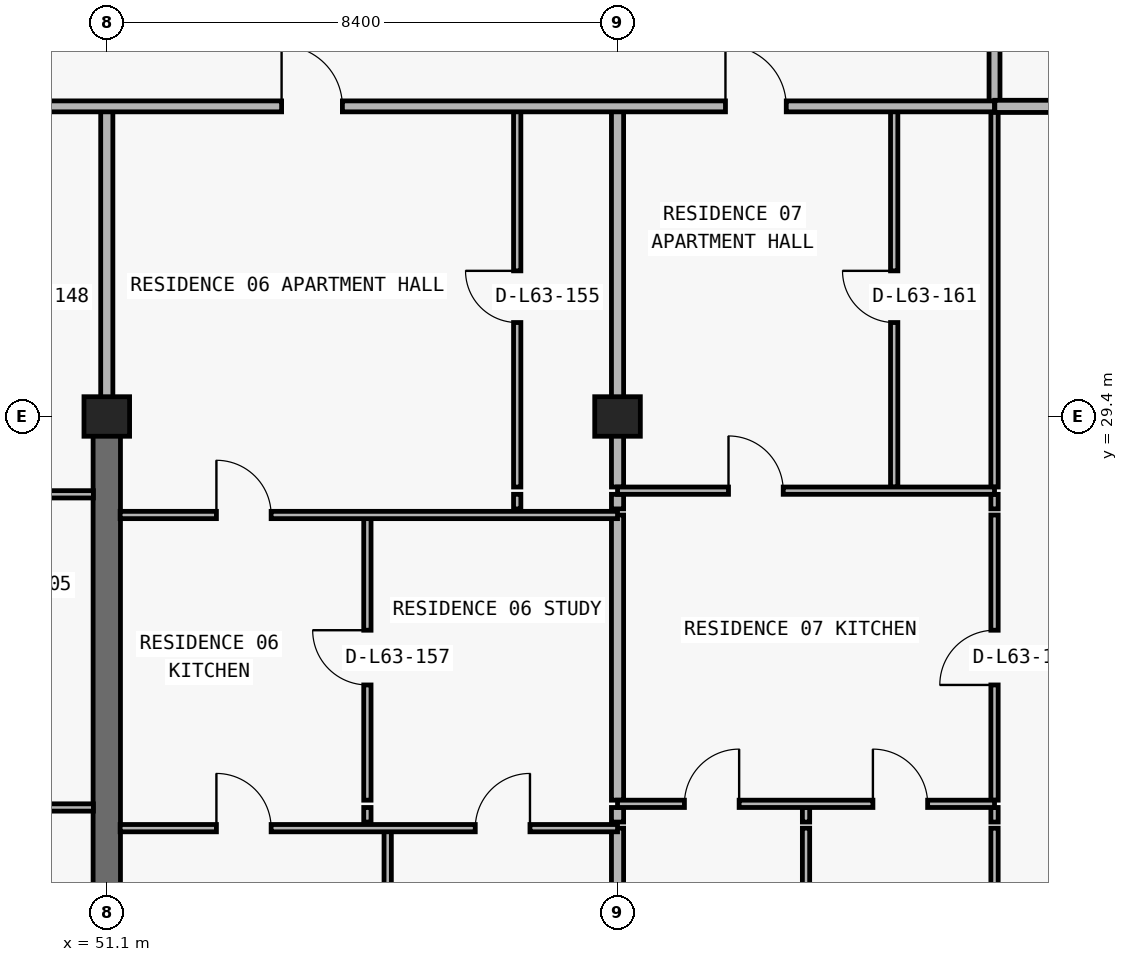
"""IFC4 building model, lengths in metres.
Left out: names, types, materials, properties, quantities, classifications, styles, units other than length and angle.
Written with IfcOpenShell. Run it as: python <this file> out.ifc"""

import sys

from ifc_helpers import new_model, si_unit, direction, frame, frame_2d, origin, origin_2d, place, context, subcontext, project, spatial, rectangle, extrude, element, fill, save


model = new_model("IFC4")
c1 = context("Model", 3, precision=1e-05, world=origin(), true_north=direction((0.0, 1.0)))
c2 = subcontext(c1, "Body", "Model", "MODEL_VIEW")
j1 = project(units=[si_unit("LENGTHUNIT", "METRE"), si_unit("PLANEANGLEUNIT", "RADIAN")], contexts=[c1])
p1 = place(None, origin())
s1 = spatial("IfcSite", under=j1, at=p1, CompositionType="ELEMENT")
p2 = place(p1, origin())
s2 = spatial("IfcBuilding", under=s1, at=p2, CompositionType="ELEMENT")
p3 = place(p2, frame((0.0, 0.0, 226.5)))
s3 = spatial("IfcBuildingStorey", under=s2, at=p3, CompositionType="ELEMENT", Elevation=226.5)
for number, where, z_axis, x_axis in (
    (1, (51.1, 29.4, 0.0), (0.0, 0.0, 1.0), (1.0, 0.0, 0.0)),
    (2, (59.5, 29.4, 0.0), (0.0, 0.0, 1.0), (1.0, 0.0, 0.0)),
):
    element("IfcColumn", number, at=place(p3, frame(where, z_axis=z_axis, x_axis=x_axis)), inside=s3, PredefinedType="COLUMN", context=c2, shape_type="SweptSolid", body=[
        extrude(rectangle(XDim=0.75, YDim=0.65, at=origin_2d()), origin(), (0.0, 0.0, 1.0), 3.05),
    ])
p4 = place(p3, frame((51.1, 20.8, 0.0), z_axis=(0.0, 0.0, 1.0), x_axis=(0.0, 1.0, 0.0)))
e3 = element("IfcWall", 3, at=p4, inside=s3, PredefinedType="SHEAR", context=c2, shape_type="SweptSolid", body=[
    extrude(rectangle(XDim=8.6, YDim=0.45, at=frame_2d((4.3, 0.0))), origin(), (0.0, 0.0, 1.0), 3.05),
])
p5 = place(p3, frame((51.1, 29.405, 0.0), z_axis=(0.0, 0.0, 1.0), x_axis=(0.0, 1.0, 0.0)))
e4 = element("IfcWall", 4, at=p5, inside=s3, PredefinedType="PARTITIONING", context=c2, shape_type="SweptSolid", body=[
    extrude(rectangle(XDim=5.095, YDim=0.2, at=frame_2d((2.547, 0.0))), origin(), (0.0, 0.0, 1.0), 2.335),
])
p6 = place(p3, frame((55.386, 22.73, 0.0), z_axis=(0.0, 0.0, 1.0), x_axis=(0.0, 1.0, 0.0)))
e5 = element("IfcWall", 5, at=p6, inside=s3, PredefinedType="PARTITIONING", context=c2, shape_type="SweptSolid", body=[
    extrude(rectangle(XDim=0.24, YDim=0.12, at=frame_2d((0.12, 0.0))), origin(), (0.0, 0.0, 1.0), 2.629),
])
p7 = place(p3, frame((55.386, 23.09, 0.0), z_axis=(0.0, 0.0, 1.0), x_axis=(0.0, 1.0, 0.0)))
e6 = element("IfcWall", 6, at=p7, inside=s3, PredefinedType="PARTITIONING", context=c2, shape_type="SweptSolid", body=[
    extrude(rectangle(XDim=4.69, YDim=0.12, at=frame_2d((2.345, 0.0))), origin(), (0.0, 0.0, 1.0), 2.629),
])
p8 = place(p7, frame((1.895, 0.0, 0.0)))
e7 = element("IfcOpeningElement", 7, at=p8, cuts=e6, PredefinedType="OPENING", context=c2, shape_type="SweptSolid", body=[
    extrude(rectangle(XDim=0.9, YDim=2.15, at=frame_2d((0.45, 1.075))), frame((0.0, 0.07, 0.0), z_axis=(0.0, -1.0, 0.0), x_axis=(1.0, 0.0, 0.0)), (0.0, 0.0, 1.0), 0.14),
])
p9 = place(p3, frame((55.72, 13.34, 0.0), z_axis=(0.0, 0.0, 1.0), x_axis=(0.0, 1.0, 0.0)))
e8 = element("IfcWall", 8, at=p9, inside=s3, PredefinedType="PARTITIONING", context=c2, shape_type="SweptSolid", body=[
    extrude(rectangle(XDim=9.29, YDim=0.12, at=frame_2d((4.645, 0.0))), origin(), (0.0, 0.0, 1.0), 3.05),
])
p10 = place(p3, frame((57.85, 27.88, 0.0), z_axis=(0.0, 0.0, 1.0), x_axis=(0.0, 1.0, 0.0)))
e9 = element("IfcWall", 9, at=p10, inside=s3, PredefinedType="PARTITIONING", context=c2, shape_type="SweptSolid", body=[
    extrude(rectangle(XDim=0.24, YDim=0.12, at=frame_2d((0.12, 0.0))), origin(), (0.0, 0.0, 1.0), 3.05),
])
p11 = place(p3, frame((57.85, 28.24, 0.0), z_axis=(0.0, 0.0, 1.0), x_axis=(0.0, 1.0, 0.0)))
e10 = element("IfcWall", 10, at=p11, inside=s3, PredefinedType="PARTITIONING", context=c2, shape_type="SweptSolid", body=[
    extrude(rectangle(XDim=6.26, YDim=0.12, at=frame_2d((3.13, 0.0))), origin(), (0.0, 0.0, 1.0), 3.05),
])
p12 = place(p11, frame((2.705, 0.0, 0.0)))
e11 = element("IfcOpeningElement", 11, at=p12, cuts=e10, PredefinedType="OPENING", context=c2, shape_type="SweptSolid", body=[
    extrude(rectangle(XDim=0.85, YDim=2.1, at=frame_2d((0.425, 1.05))), frame((0.0, 0.07, 0.0), z_axis=(0.0, -1.0, 0.0), x_axis=(1.0, 0.0, 0.0)), (0.0, 0.0, 1.0), 0.14),
])
p13 = place(p3, frame((59.5, 13.34, 0.0), z_axis=(0.0, 0.0, 1.0), x_axis=(0.0, 1.0, 0.0)))
e12 = element("IfcWall", 12, at=p13, inside=s3, PredefinedType="PARTITIONING", context=c2, shape_type="SweptSolid", body=[
    extrude(rectangle(XDim=9.29, YDim=0.2, at=frame_2d((4.645, 0.0))), origin(), (0.0, 0.0, 1.0), 2.263),
])
p14 = place(p3, frame((59.5, 22.73, 0.0), z_axis=(0.0, 0.0, 1.0), x_axis=(0.0, 1.0, 0.0)))
e13 = element("IfcWall", 13, at=p14, inside=s3, PredefinedType="PARTITIONING", context=c2, shape_type="SweptSolid", body=[
    extrude(rectangle(XDim=0.24, YDim=0.2, at=frame_2d((0.12, 0.0))), origin(), (0.0, 0.0, 1.0), 2.263),
])
p15 = place(p3, frame((59.5, 23.09, 0.0), z_axis=(0.0, 0.0, 1.0), x_axis=(0.0, 1.0, 0.0)))
e14 = element("IfcWall", 14, at=p15, inside=s3, PredefinedType="PARTITIONING", context=c2, shape_type="SweptSolid", body=[
    extrude(rectangle(XDim=4.69, YDim=0.2, at=frame_2d((2.345, 0.0))), origin(), (0.0, 0.0, 1.0), 2.263),
])
p16 = place(p3, frame((59.5, 27.88, 0.0), z_axis=(0.0, 0.0, 1.0), x_axis=(0.0, 1.0, 0.0)))
e15 = element("IfcWall", 15, at=p16, inside=s3, PredefinedType="PARTITIONING", context=c2, shape_type="SweptSolid", body=[
    extrude(rectangle(XDim=0.24, YDim=0.2, at=frame_2d((0.12, 0.0))), origin(), (0.0, 0.0, 1.0), 2.263),
])
p17 = place(p3, frame((59.5, 28.24, 0.0), z_axis=(0.0, 0.0, 1.0), x_axis=(0.0, 1.0, 0.0)))
e16 = element("IfcWall", 16, at=p17, inside=s3, PredefinedType="PARTITIONING", context=c2, shape_type="SweptSolid", body=[
    extrude(rectangle(XDim=6.26, YDim=0.2, at=frame_2d((3.13, 0.0))), origin(), (0.0, 0.0, 1.0), 2.263),
])
p18 = place(p3, frame((62.6, 13.34, 0.0), z_axis=(0.0, 0.0, 1.0), x_axis=(0.0, 1.0, 0.0)))
e17 = element("IfcWall", 17, at=p18, inside=s3, PredefinedType="PARTITIONING", context=c2, shape_type="SweptSolid", body=[
    extrude(rectangle(XDim=9.29, YDim=0.12, at=frame_2d((4.645, 0.0))), origin(), (0.0, 0.0, 1.0), 3.05),
])
p19 = place(p3, frame((62.6, 22.73, 0.0), z_axis=(0.0, 0.0, 1.0), x_axis=(0.0, 1.0, 0.0)))
e18 = element("IfcWall", 18, at=p19, inside=s3, PredefinedType="PARTITIONING", context=c2, shape_type="SweptSolid", body=[
    extrude(rectangle(XDim=0.24, YDim=0.12, at=frame_2d((0.12, 0.0))), origin(), (0.0, 0.0, 1.0), 3.05),
])
p20 = place(p3, frame((64.05, 28.24, 0.0), z_axis=(0.0, 0.0, 1.0), x_axis=(0.0, 1.0, 0.0)))
e19 = element("IfcWall", 19, at=p20, inside=s3, PredefinedType="PARTITIONING", context=c2, shape_type="SweptSolid", body=[
    extrude(rectangle(XDim=6.26, YDim=0.12, at=frame_2d((3.13, 0.0))), origin(), (0.0, 0.0, 1.0), 3.05),
])
p21 = place(p20, frame((2.705, 0.0, 0.0)))
e20 = element("IfcOpeningElement", 20, at=p21, cuts=e19, PredefinedType="OPENING", context=c2, shape_type="SweptSolid", body=[
    extrude(rectangle(XDim=0.85, YDim=2.1, at=frame_2d((0.425, 1.05))), frame((0.0, 0.07, 0.0), z_axis=(0.0, -1.0, 0.0), x_axis=(1.0, 0.0, 0.0)), (0.0, 0.0, 1.0), 0.14),
])
p22 = place(p3, frame((65.7, 13.42, 0.0), z_axis=(0.0, 0.0, 1.0), x_axis=(0.0, 1.0, 0.0)))
e21 = element("IfcWall", 21, at=p22, inside=s3, PredefinedType="PARTITIONING", context=c2, shape_type="SweptSolid", body=[
    extrude(rectangle(XDim=9.21, YDim=0.12, at=frame_2d((4.605, 0.0))), origin(), (0.0, 0.0, 1.0), 3.05),
])
p23 = place(p3, frame((65.7, 22.73, 0.0), z_axis=(0.0, 0.0, 1.0), x_axis=(0.0, 1.0, 0.0)))
e22 = element("IfcWall", 22, at=p23, inside=s3, PredefinedType="PARTITIONING", context=c2, shape_type="SweptSolid", body=[
    extrude(rectangle(XDim=0.24, YDim=0.12, at=frame_2d((0.12, 0.0))), origin(), (0.0, 0.0, 1.0), 3.05),
])
p24 = place(p3, frame((65.7, 23.09, 0.0), z_axis=(0.0, 0.0, 1.0), x_axis=(0.0, 1.0, 0.0)))
e23 = element("IfcWall", 23, at=p24, inside=s3, PredefinedType="PARTITIONING", context=c2, shape_type="SweptSolid", body=[
    extrude(rectangle(XDim=4.69, YDim=0.12, at=frame_2d((2.345, 0.0))), origin(), (0.0, 0.0, 1.0), 3.05),
])
p25 = place(p24, frame((1.895, 0.0, 0.0)))
e24 = element("IfcOpeningElement", 24, at=p25, cuts=e23, PredefinedType="OPENING", context=c2, shape_type="SweptSolid", body=[
    extrude(rectangle(XDim=0.9, YDim=2.15, at=frame_2d((0.45, 1.075))), frame((0.0, 0.07, 0.0), z_axis=(0.0, -1.0, 0.0), x_axis=(1.0, 0.0, 0.0)), (0.0, 0.0, 1.0), 0.14),
])
p26 = place(p3, frame((65.7, 27.88, 0.0), z_axis=(0.0, 0.0, 1.0), x_axis=(0.0, 1.0, 0.0)))
e25 = element("IfcWall", 25, at=p26, inside=s3, PredefinedType="PARTITIONING", context=c2, shape_type="SweptSolid", body=[
    extrude(rectangle(XDim=0.24, YDim=0.12, at=frame_2d((0.12, 0.0))), origin(), (0.0, 0.0, 1.0), 3.05),
])
p27 = place(p3, frame((65.7, 28.24, 0.0), z_axis=(0.0, 0.0, 1.0), x_axis=(0.0, 1.0, 0.0)))
e26 = element("IfcWall", 26, at=p27, inside=s3, PredefinedType="PARTITIONING", context=c2, shape_type="SweptSolid", body=[
    extrude(rectangle(XDim=6.26, YDim=0.12, at=frame_2d((3.13, 0.0))), origin(), (0.0, 0.0, 1.0), 3.05),
])
p28 = place(p3, frame((65.7, 34.505, 0.0), z_axis=(0.0, 0.0, 1.0), x_axis=(0.0, 1.0, 0.0)))
e27 = element("IfcWall", 27, at=p28, inside=s3, PredefinedType="PARTITIONING", context=c2, shape_type="SweptSolid", body=[
    extrude(rectangle(XDim=2.495, YDim=0.18, at=frame_2d((1.248, 0.0))), origin(), (0.0, 0.0, 1.0), 3.05),
])
p29 = place(p3, frame((51.32, 22.63, 0.0), z_axis=(0.0, 0.0, 1.0), x_axis=(1.0, 0.0, 0.0)))
e28 = element("IfcWall", 28, at=p29, inside=s3, PredefinedType="PARTITIONING", context=c2, shape_type="SweptSolid", body=[
    extrude(rectangle(XDim=8.18, YDim=0.12, at=frame_2d((4.09, 0.0))), origin(), (0.0, 0.0, 1.0), 3.05),
])
p30 = place(p29, frame((1.583, 0.0, 0.0)))
e29 = element("IfcOpeningElement", 29, at=p30, cuts=e28, PredefinedType="OPENING", context=c2, shape_type="SweptSolid", body=[
    extrude(rectangle(XDim=0.9, YDim=2.15, at=frame_2d((0.45, 1.075))), frame((0.0, 0.07, 0.0), z_axis=(0.0, -1.0, 0.0), x_axis=(1.0, 0.0, 0.0)), (0.0, 0.0, 1.0), 0.14),
])
p31 = place(p29, frame((5.84, 0.0, 0.0)))
e30 = element("IfcOpeningElement", 30, at=p31, cuts=e28, PredefinedType="OPENING", context=c2, shape_type="SweptSolid", body=[
    extrude(rectangle(XDim=0.9, YDim=2.15, at=frame_2d((0.45, 1.075))), frame((0.0, 0.07, 0.0), z_axis=(0.0, -1.0, 0.0), x_axis=(1.0, 0.0, 0.0)), (0.0, 0.0, 1.0), 0.14),
])
p32 = place(p3, frame((42.7, 22.97, 0.0), z_axis=(0.0, 0.0, 1.0), x_axis=(1.0, 0.0, 0.0)))
e31 = element("IfcWall", 31, at=p32, inside=s3, PredefinedType="PARTITIONING", context=c2, shape_type="SweptSolid", body=[
    extrude(rectangle(XDim=8.18, YDim=0.12, at=frame_2d((4.09, 0.0))), origin(), (0.0, 0.0, 1.0), 3.05),
])
p33 = place(p32, frame((1.524, 0.0, 0.0)))
e32 = element("IfcOpeningElement", 32, at=p33, cuts=e31, PredefinedType="OPENING", context=c2, shape_type="SweptSolid", body=[
    extrude(rectangle(XDim=0.9, YDim=2.15, at=frame_2d((0.45, 1.075))), frame((0.0, 0.07, 0.0), z_axis=(0.0, -1.0, 0.0), x_axis=(1.0, 0.0, 0.0)), (0.0, 0.0, 1.0), 0.14),
])
p34 = place(p32, frame((6.033, 0.0, 0.0)))
e33 = element("IfcOpeningElement", 33, at=p34, cuts=e31, PredefinedType="OPENING", context=c2, shape_type="SweptSolid", body=[
    extrude(rectangle(XDim=0.9, YDim=2.15, at=frame_2d((0.45, 1.075))), frame((0.0, 0.07, 0.0), z_axis=(0.0, -1.0, 0.0), x_axis=(1.0, 0.0, 0.0)), (0.0, 0.0, 1.0), 0.14),
])
p35 = place(p3, frame((59.5, 23.03, 0.0), z_axis=(0.0, 0.0, 1.0), x_axis=(1.0, 0.0, 0.0)))
e34 = element("IfcWall", 34, at=p35, inside=s3, PredefinedType="PARTITIONING", context=c2, shape_type="SweptSolid", body=[
    extrude(rectangle(XDim=6.2, YDim=0.12, at=frame_2d((3.1, 0.0))), origin(), (0.0, 0.0, 1.0), 3.05),
])
p36 = place(p35, frame((1.1, 0.0, 0.0)))
e35 = element("IfcOpeningElement", 35, at=p36, cuts=e34, PredefinedType="OPENING", context=c2, shape_type="SweptSolid", body=[
    extrude(rectangle(XDim=0.9, YDim=2.15, at=frame_2d((0.45, 1.075))), frame((0.0, 0.07, 0.0), z_axis=(0.0, -1.0, 0.0), x_axis=(1.0, 0.0, 0.0)), (0.0, 0.0, 1.0), 0.14),
])
p37 = place(p35, frame((4.2, 0.0, 0.0)))
e36 = element("IfcOpeningElement", 36, at=p37, cuts=e34, PredefinedType="OPENING", context=c2, shape_type="SweptSolid", body=[
    extrude(rectangle(XDim=0.9, YDim=2.15, at=frame_2d((0.45, 1.075))), frame((0.0, 0.07, 0.0), z_axis=(0.0, -1.0, 0.0), x_axis=(1.0, 0.0, 0.0)), (0.0, 0.0, 1.0), 0.14),
])
p38 = place(p3, frame((51.32, 27.78, 0.0), z_axis=(0.0, 0.0, 1.0), x_axis=(1.0, 0.0, 0.0)))
e37 = element("IfcWall", 37, at=p38, inside=s3, PredefinedType="PARTITIONING", context=c2, shape_type="SweptSolid", body=[
    extrude(rectangle(XDim=8.18, YDim=0.12, at=frame_2d((4.09, 0.0))), origin(), (0.0, 0.0, 1.0), 3.05),
])
p39 = place(p38, frame((1.583, 0.0, 0.0)))
e38 = element("IfcOpeningElement", 38, at=p39, cuts=e37, PredefinedType="OPENING", context=c2, shape_type="SweptSolid", body=[
    extrude(rectangle(XDim=0.9, YDim=2.15, at=frame_2d((0.45, 1.075))), frame((0.0, 0.07, 0.0), z_axis=(0.0, -1.0, 0.0), x_axis=(1.0, 0.0, 0.0)), (0.0, 0.0, 1.0), 0.14),
])
p40 = place(p3, frame((42.7, 28.12, 0.0), z_axis=(0.0, 0.0, 1.0), x_axis=(1.0, 0.0, 0.0)))
e39 = element("IfcWall", 39, at=p40, inside=s3, PredefinedType="PARTITIONING", context=c2, shape_type="SweptSolid", body=[
    extrude(rectangle(XDim=8.18, YDim=0.12, at=frame_2d((4.09, 0.0))), origin(), (0.0, 0.0, 1.0), 3.05),
])
p41 = place(p40, frame((1.943, 0.0, 0.0)))
e40 = element("IfcOpeningElement", 40, at=p41, cuts=e39, PredefinedType="OPENING", context=c2, shape_type="SweptSolid", body=[
    extrude(rectangle(XDim=0.9, YDim=2.15, at=frame_2d((0.45, 1.075))), frame((0.0, 0.07, 0.0), z_axis=(0.0, -1.0, 0.0), x_axis=(1.0, 0.0, 0.0)), (0.0, 0.0, 1.0), 0.14),
])
p42 = place(p3, frame((59.5, 28.18, 0.0), z_axis=(0.0, 0.0, 1.0), x_axis=(1.0, 0.0, 0.0)))
e41 = element("IfcWall", 41, at=p42, inside=s3, PredefinedType="PARTITIONING", context=c2, shape_type="SweptSolid", body=[
    extrude(rectangle(XDim=6.2, YDim=0.12, at=frame_2d((3.1, 0.0))), origin(), (0.0, 0.0, 1.0), 3.05),
])
p43 = place(p42, frame((1.825, 0.0, 0.0)))
e42 = element("IfcOpeningElement", 42, at=p43, cuts=e41, PredefinedType="OPENING", context=c2, shape_type="SweptSolid", body=[
    extrude(rectangle(XDim=0.9, YDim=2.15, at=frame_2d((0.45, 1.075))), frame((0.0, 0.07, 0.0), z_axis=(0.0, -1.0, 0.0), x_axis=(1.0, 0.0, 0.0)), (0.0, 0.0, 1.0), 0.14),
])
p44 = place(p3, frame((39.28, 34.5, 0.0), z_axis=(0.0, 0.0, 1.0), x_axis=(1.0, 0.0, 0.0)))
e43 = element("IfcWall", 43, at=p44, inside=s3, PredefinedType="PARTITIONING", context=c2, shape_type="SweptSolid", body=[
    extrude(rectangle(XDim=26.42, YDim=0.18, at=frame_2d((13.21, 0.0))), origin(), (0.0, 0.0, 1.0), 3.05),
])
p45 = place(p44, frame((6.295, 0.0, 0.0)))
e44 = element("IfcOpeningElement", 44, at=p45, cuts=e43, PredefinedType="OPENING", context=c2, shape_type="SweptSolid", body=[
    extrude(rectangle(XDim=1.0, YDim=2.2, at=frame_2d((0.5, 1.1))), frame((0.0, 0.1, 0.0), z_axis=(0.0, -1.0, 0.0), x_axis=(1.0, 0.0, 0.0)), (0.0, 0.0, 1.0), 0.2),
])
p46 = place(p44, frame((14.695, 0.0, 0.0)))
e45 = element("IfcOpeningElement", 45, at=p46, cuts=e43, PredefinedType="OPENING", context=c2, shape_type="SweptSolid", body=[
    extrude(rectangle(XDim=1.0, YDim=2.2, at=frame_2d((0.5, 1.1))), frame((0.0, 0.1, 0.0), z_axis=(0.0, -1.0, 0.0), x_axis=(1.0, 0.0, 0.0)), (0.0, 0.0, 1.0), 0.2),
])
p47 = place(p44, frame((21.995, 0.0, 0.0)))
e46 = element("IfcOpeningElement", 46, at=p47, cuts=e43, PredefinedType="OPENING", context=c2, shape_type="SweptSolid", body=[
    extrude(rectangle(XDim=1.0, YDim=2.2, at=frame_2d((0.5, 1.1))), frame((0.0, 0.1, 0.0), z_axis=(0.0, -1.0, 0.0), x_axis=(1.0, 0.0, 0.0)), (0.0, 0.0, 1.0), 0.2),
])
p48 = place(p3, frame((65.705, 34.5, 0.0), z_axis=(0.0, 0.0, 1.0), x_axis=(1.0, 0.0, 0.0)))
e47 = element("IfcWall", 47, at=p48, inside=s3, PredefinedType="PARTITIONING", context=c2, shape_type="SweptSolid", body=[
    extrude(rectangle(XDim=3.7, YDim=0.2, at=frame_2d((1.85, 0.0))), origin(), (0.0, 0.0, 1.0), 3.05),
])
p49 = place(p46, origin())
e48 = element("IfcDoor", 48, at=p49, inside=s3, OperationType="SINGLE_SWING_LEFT", PredefinedType="DOOR", context=c2, shape_type="SweptSolid", body=[
    extrude(rectangle(XDim=1.0, YDim=2.2, at=frame_2d((0.5, 1.1))), frame((0.0, 0.025, 0.0), z_axis=(0.0, -1.0, 0.0), x_axis=(1.0, 0.0, 0.0)), (0.0, 0.0, 1.0), 0.05),
])
fill(e45, e48)
p50 = place(p12, origin())
e49 = element("IfcDoor", 49, at=p50, inside=s3, OperationType="SINGLE_SWING_RIGHT", PredefinedType="DOOR", context=c2, shape_type="SweptSolid", body=[
    extrude(rectangle(XDim=0.85, YDim=2.1, at=frame_2d((0.425, 1.05))), frame((0.0, 0.025, 0.0), z_axis=(0.0, -1.0, 0.0), x_axis=(1.0, 0.0, 0.0)), (0.0, 0.0, 1.0), 0.05),
])
fill(e11, e49)
p51 = place(p39, origin())
e50 = element("IfcDoor", 50, at=p51, inside=s3, OperationType="SINGLE_SWING_LEFT", PredefinedType="DOOR", context=c2, shape_type="SweptSolid", body=[
    extrude(rectangle(XDim=0.9, YDim=2.15, at=frame_2d((0.45, 1.075))), frame((0.0, 0.025, 0.0), z_axis=(0.0, -1.0, 0.0), x_axis=(1.0, 0.0, 0.0)), (0.0, 0.0, 1.0), 0.05),
])
fill(e38, e50)
p52 = place(p8, origin())
e51 = element("IfcDoor", 51, at=p52, inside=s3, OperationType="SINGLE_SWING_RIGHT", PredefinedType="DOOR", context=c2, shape_type="SweptSolid", body=[
    extrude(rectangle(XDim=0.9, YDim=2.15, at=frame_2d((0.45, 1.075))), frame((0.0, 0.025, 0.0), z_axis=(0.0, -1.0, 0.0), x_axis=(1.0, 0.0, 0.0)), (0.0, 0.0, 1.0), 0.05),
])
fill(e7, e51)
p53 = place(p30, origin())
e52 = element("IfcDoor", 52, at=p53, inside=s3, OperationType="SINGLE_SWING_LEFT", PredefinedType="DOOR", context=c2, shape_type="SweptSolid", body=[
    extrude(rectangle(XDim=0.9, YDim=2.15, at=frame_2d((0.45, 1.075))), frame((0.0, 0.025, 0.0), z_axis=(0.0, -1.0, 0.0), x_axis=(1.0, 0.0, 0.0)), (0.0, 0.0, 1.0), 0.05),
])
fill(e29, e52)
p54 = place(p31, origin())
e53 = element("IfcDoor", 53, at=p54, inside=s3, OperationType="SINGLE_SWING_RIGHT", PredefinedType="DOOR", context=c2, shape_type="SweptSolid", body=[
    extrude(rectangle(XDim=0.9, YDim=2.15, at=frame_2d((0.45, 1.075))), frame((0.0, 0.025, 0.0), z_axis=(0.0, -1.0, 0.0), x_axis=(1.0, 0.0, 0.0)), (0.0, 0.0, 1.0), 0.05),
])
fill(e30, e53)
p55 = place(p47, origin())
e54 = element("IfcDoor", 54, at=p55, inside=s3, OperationType="SINGLE_SWING_LEFT", PredefinedType="DOOR", context=c2, shape_type="SweptSolid", body=[
    extrude(rectangle(XDim=1.0, YDim=2.2, at=frame_2d((0.5, 1.1))), frame((0.0, 0.025, 0.0), z_axis=(0.0, -1.0, 0.0), x_axis=(1.0, 0.0, 0.0)), (0.0, 0.0, 1.0), 0.05),
])
fill(e46, e54)
p56 = place(p21, origin())
e55 = element("IfcDoor", 55, at=p56, inside=s3, OperationType="SINGLE_SWING_RIGHT", PredefinedType="DOOR", context=c2, shape_type="SweptSolid", body=[
    extrude(rectangle(XDim=0.85, YDim=2.1, at=frame_2d((0.425, 1.05))), frame((0.0, 0.025, 0.0), z_axis=(0.0, -1.0, 0.0), x_axis=(1.0, 0.0, 0.0)), (0.0, 0.0, 1.0), 0.05),
])
fill(e20, e55)
p57 = place(p43, origin())
e56 = element("IfcDoor", 56, at=p57, inside=s3, OperationType="SINGLE_SWING_LEFT", PredefinedType="DOOR", context=c2, shape_type="SweptSolid", body=[
    extrude(rectangle(XDim=0.9, YDim=2.15, at=frame_2d((0.45, 1.075))), frame((0.0, 0.025, 0.0), z_axis=(0.0, -1.0, 0.0), x_axis=(1.0, 0.0, 0.0)), (0.0, 0.0, 1.0), 0.05),
])
fill(e42, e56)
p58 = place(p36, origin())
e57 = element("IfcDoor", 57, at=p58, inside=s3, OperationType="SINGLE_SWING_RIGHT", PredefinedType="DOOR", context=c2, shape_type="SweptSolid", body=[
    extrude(rectangle(XDim=0.9, YDim=2.15, at=frame_2d((0.45, 1.075))), frame((0.0, 0.025, 0.0), z_axis=(0.0, -1.0, 0.0), x_axis=(1.0, 0.0, 0.0)), (0.0, 0.0, 1.0), 0.05),
])
fill(e35, e57)
p59 = place(p37, origin())
e58 = element("IfcDoor", 58, at=p59, inside=s3, OperationType="SINGLE_SWING_LEFT", PredefinedType="DOOR", context=c2, shape_type="SweptSolid", body=[
    extrude(rectangle(XDim=0.9, YDim=2.15, at=frame_2d((0.45, 1.075))), frame((0.0, 0.025, 0.0), z_axis=(0.0, -1.0, 0.0), x_axis=(1.0, 0.0, 0.0)), (0.0, 0.0, 1.0), 0.05),
])
fill(e36, e58)
p60 = place(p25, origin())
e59 = element("IfcDoor", 59, at=p60, inside=s3, OperationType="SINGLE_SWING_LEFT", PredefinedType="DOOR", context=c2, shape_type="SweptSolid", body=[
    extrude(rectangle(XDim=0.9, YDim=2.15, at=frame_2d((0.45, 1.075))), frame((0.0, 0.025, 0.0), z_axis=(0.0, -1.0, 0.0), x_axis=(1.0, 0.0, 0.0)), (0.0, 0.0, 1.0), 0.05),
])
fill(e24, e59)
save(model, sys.argv[1])
